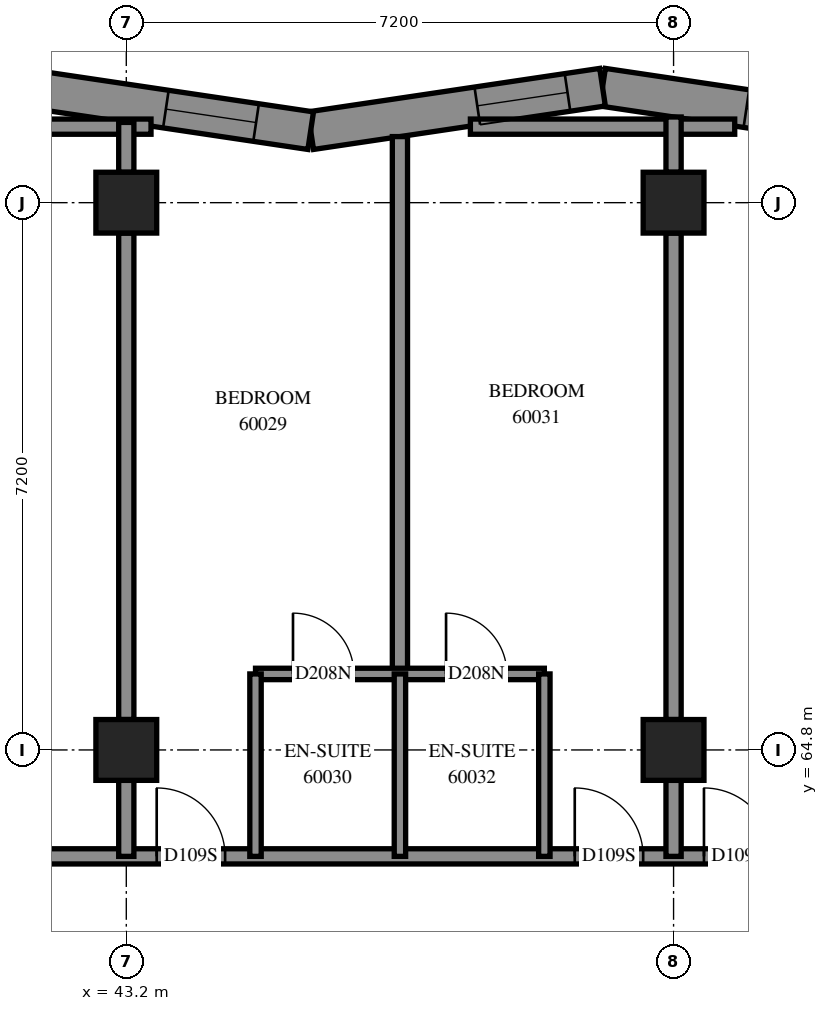
"""IFC4 building model, lengths in metres.
Left out: names, types, materials, properties, quantities, classifications, styles, units other than length and angle.
Written with IfcOpenShell. Run it as: python <this file> out.ifc"""

import sys

from ifc_helpers import new_model, si_unit, direction, frame, frame_2d, origin, origin_2d, place, context, subcontext, project, spatial, polyline, rectangle, outline, extrude, element, fill, save


model = new_model("IFC4")
c1 = context("Model", 3, precision=1e-05, world=origin(), true_north=direction((0.0, 1.0)))
c2 = subcontext(c1, "Body", "Model", "MODEL_VIEW")
j1 = project(units=[si_unit("LENGTHUNIT", "METRE"), si_unit("PLANEANGLEUNIT", "RADIAN")], contexts=[c1])
p1 = place(None, origin())
s1 = spatial("IfcSite", under=j1, at=p1, CompositionType="ELEMENT")
p2 = place(p1, origin())
s2 = spatial("IfcBuilding", under=s1, at=p2, CompositionType="ELEMENT")
p3 = place(p2, frame((0.0, 0.0, 220.2)))
s3 = spatial("IfcBuildingStorey", under=s2, at=p3, CompositionType="ELEMENT", Elevation=220.2)
for number, where, z_axis, x_axis in (
    (1, (43.2, 64.8, 0.0), (0.0, 0.0, 1.0), (1.0, 0.0, 0.0)),
    (2, (43.2, 72.0, 0.0), (0.0, 0.0, 1.0), (1.0, 0.0, 0.0)),
    (3, (50.4, 64.8, 0.0), (0.0, 0.0, 1.0), (1.0, 0.0, 0.0)),
    (4, (50.4, 72.0, 0.0), (0.0, 0.0, 1.0), (1.0, 0.0, 0.0)),
):
    element("IfcColumn", number, at=place(p3, frame(where, z_axis=z_axis, x_axis=x_axis)), inside=s3, PredefinedType="COLUMN", context=c2, shape_type="SweptSolid", body=[
        extrude(rectangle(XDim=0.8, YDim=0.8, at=origin_2d()), origin(), (0.0, 0.0, 1.0), 3.1),
    ])
p4 = place(p3, frame((53.305, 72.947, 0.0), z_axis=(0.0, 0.0, 1.0), x_axis=(-0.9890847468, 0.1473477641, 0.0)))
e5 = element("IfcWall", 5, at=p4, inside=s3, PredefinedType="SOLIDWALL", context=c2, shape_type="SweptSolid", body=[
    extrude(outline(polyline([(0.037, -0.25), (3.919, -0.25), (3.845, 0.25), (-0.037, 0.25), (0.037, -0.25)])), origin(), (0.0, 0.0, 1.0), 3.1),
])
p5 = place(p4, frame((0.769, 0.0, 0.45)))
e6 = element("IfcOpeningElement", 6, at=p5, cuts=e5, PredefinedType="OPENING", context=c2, shape_type="SweptSolid", body=[
    extrude(rectangle(XDim=1.2, YDim=2.5, at=frame_2d((0.6, 1.25))), frame((0.0, 0.26, 0.0), z_axis=(0.0, -1.0, 0.0), x_axis=(1.0, 0.0, 0.0)), (0.0, 0.0, 1.0), 0.52),
])
p6 = place(p3, frame((49.466, 73.519, 0.0), z_axis=(0.0, 0.0, 1.0), x_axis=(-0.9890847468, -0.1473477641, 0.0)))
e7 = element("IfcWall", 7, at=p6, inside=s3, PredefinedType="SOLIDWALL", context=c2, shape_type="SweptSolid", body=[
    extrude(outline(polyline([(-0.037, -0.25), (3.845, -0.25), (3.919, 0.25), (0.037, 0.25), (-0.037, -0.25)])), origin(), (0.0, 0.0, 1.0), 3.1),
])
p7 = place(p6, frame((0.466, 0.0, 0.45)))
e8 = element("IfcOpeningElement", 8, at=p7, cuts=e7, PredefinedType="OPENING", context=c2, shape_type="SweptSolid", body=[
    extrude(rectangle(XDim=1.2, YDim=2.5, at=frame_2d((0.6, 1.25))), frame((0.0, 0.26, 0.0), z_axis=(0.0, -1.0, 0.0), x_axis=(1.0, 0.0, 0.0)), (0.0, 0.0, 1.0), 0.52),
])
p8 = place(p3, frame((45.626, 72.947, 0.0), z_axis=(0.0, 0.0, 1.0), x_axis=(-0.9890853061, 0.14734401, 0.0)))
e9 = element("IfcWall", 9, at=p8, inside=s3, PredefinedType="SOLIDWALL", context=c2, shape_type="SweptSolid", body=[
    extrude(outline(polyline([(0.037, -0.25), (3.919, -0.25), (3.845, 0.25), (-0.037, 0.25), (0.037, -0.25)])), origin(), (0.0, 0.0, 1.0), 3.1),
])
p9 = place(p8, frame((0.726, 0.0, 0.45)))
e10 = element("IfcOpeningElement", 10, at=p9, cuts=e9, PredefinedType="OPENING", context=c2, shape_type="SweptSolid", body=[
    extrude(rectangle(XDim=1.2, YDim=2.5, at=frame_2d((0.6, 1.25))), frame((0.0, 0.26, 0.0), z_axis=(0.0, -1.0, 0.0), x_axis=(1.0, 0.0, 0.0)), (0.0, 0.0, 1.0), 0.52),
])
p10 = place(p3, frame((40.602, 63.4, 0.0), z_axis=(0.0, 0.0, 1.0), x_axis=(1.0, 0.0, 0.0)))
e11 = element("IfcWall", 11, at=p10, inside=s3, PredefinedType="PARTITIONING", context=c2, shape_type="SweptSolid", body=[
    extrude(rectangle(XDim=14.398, YDim=0.2, at=frame_2d((7.199, 0.0))), origin(), (0.0, 0.0, 1.0), 3.1),
])
p11 = place(p10, frame((2.998, 0.0, 0.0)))
e12 = element("IfcOpeningElement", 12, at=p11, cuts=e11, PredefinedType="OPENING", context=c2, shape_type="SweptSolid", body=[
    extrude(rectangle(XDim=0.9, YDim=2.1, at=frame_2d((0.45, 1.05))), frame((0.0, 0.11, 0.0), z_axis=(0.0, -1.0, 0.0), x_axis=(1.0, 0.0, 0.0)), (0.0, 0.0, 1.0), 0.22),
])
p12 = place(p10, frame((8.498, 0.0, 0.0)))
e13 = element("IfcOpeningElement", 13, at=p12, cuts=e11, PredefinedType="OPENING", context=c2, shape_type="SweptSolid", body=[
    extrude(rectangle(XDim=0.9, YDim=2.1, at=frame_2d((0.45, 1.05))), frame((0.0, 0.11, 0.0), z_axis=(0.0, -1.0, 0.0), x_axis=(1.0, 0.0, 0.0)), (0.0, 0.0, 1.0), 0.22),
])
p13 = place(p10, frame((10.198, 0.0, 0.0)))
e14 = element("IfcOpeningElement", 14, at=p13, cuts=e11, PredefinedType="OPENING", context=c2, shape_type="SweptSolid", body=[
    extrude(rectangle(XDim=0.9, YDim=2.1, at=frame_2d((0.45, 1.05))), frame((0.0, 0.11, 0.0), z_axis=(0.0, -1.0, 0.0), x_axis=(1.0, 0.0, 0.0)), (0.0, 0.0, 1.0), 0.22),
])
p14 = place(p3, frame((46.8, 65.8, 0.0), z_axis=(0.0, 0.0, 1.0), x_axis=(0.0, 1.0, 0.0)))
e15 = element("IfcWall", 15, at=p14, inside=s3, PredefinedType="PARTITIONING", context=c2, shape_type="SweptSolid", body=[
    extrude(rectangle(XDim=7.069, YDim=0.2, at=frame_2d((3.535, 0.0))), origin(), (0.0, 0.0, 1.0), 3.1),
])
for number, where, z_axis, x_axis in (
    (16, (43.2, 65.2, 0.0), (0.0, 0.0, 1.0), (0.0, 1.0, 0.0)),
    (17, (50.4, 65.2, 0.0), (0.0, 0.0, 1.0), (0.0, 1.0, 0.0)),
):
    element("IfcWall", number, at=place(p3, frame(where, z_axis=z_axis, x_axis=x_axis)), inside=s3, PredefinedType="PARTITIONING", context=c2, shape_type="SweptSolid", body=[
        extrude(rectangle(XDim=6.4, YDim=0.2, at=frame_2d((3.2, 0.0))), origin(), (0.0, 0.0, 1.0), 3.1),
    ])
p15 = place(p3, frame((44.9, 65.8, 0.0), z_axis=(0.0, 0.0, 1.0), x_axis=(1.0, 0.0, 0.0)))
e18 = element("IfcWall", 18, at=p15, inside=s3, PredefinedType="PARTITIONING", context=c2, shape_type="SweptSolid", body=[
    extrude(rectangle(XDim=3.8, YDim=0.15, at=frame_2d((1.9, 0.0))), origin(), (0.0, 0.0, 1.0), 3.1),
])
p16 = place(p15, frame((0.493, 0.0, 0.0)))
e19 = element("IfcOpeningElement", 19, at=p16, cuts=e18, PredefinedType="OPENING", context=c2, shape_type="SweptSolid", body=[
    extrude(rectangle(XDim=0.8, YDim=2.1, at=frame_2d((0.4, 1.05))), frame((0.0, 0.085, 0.0), z_axis=(0.0, -1.0, 0.0), x_axis=(1.0, 0.0, 0.0)), (0.0, 0.0, 1.0), 0.17),
])
p17 = place(p15, frame((2.507, 0.0, 0.0)))
e20 = element("IfcOpeningElement", 20, at=p17, cuts=e18, PredefinedType="OPENING", context=c2, shape_type="SweptSolid", body=[
    extrude(rectangle(XDim=0.8, YDim=2.1, at=frame_2d((0.4, 1.05))), frame((0.0, 0.085, 0.0), z_axis=(0.0, -1.0, 0.0), x_axis=(1.0, 0.0, 0.0)), (0.0, 0.0, 1.0), 0.17),
])
p18 = place(p3, frame((40.048, 73.0, 0.0), z_axis=(0.0, 0.0, 1.0), x_axis=(1.0, 0.0, 0.0)))
e21 = element("IfcWall", 21, at=p18, inside=s3, PredefinedType="PARTITIONING", context=c2, shape_type="SweptSolid", body=[
    extrude(rectangle(XDim=3.478, YDim=0.2, at=frame_2d((1.739, 0.0))), origin(), (0.0, 0.0, 1.0), 3.1),
])
p19 = place(p3, frame((47.727, 73.0, 0.0), z_axis=(0.0, 0.0, 1.0), x_axis=(1.0, 0.0, 0.0)))
e22 = element("IfcWall", 22, at=p19, inside=s3, PredefinedType="PARTITIONING", context=c2, shape_type="SweptSolid", body=[
    extrude(rectangle(XDim=3.478, YDim=0.2, at=frame_2d((1.739, 0.0))), origin(), (0.0, 0.0, 1.0), 3.1),
])
for number, where, z_axis, x_axis in (
    (23, (44.9, 63.4, 0.0), (0.0, 0.0, 1.0), (0.0, 1.0, 0.0)),
    (24, (46.8, 63.4, 0.0), (0.0, 0.0, 1.0), (0.0, 1.0, 0.0)),
    (25, (48.7, 63.4, 0.0), (0.0, 0.0, 1.0), (0.0, 1.0, 0.0)),
):
    element("IfcWall", number, at=place(p3, frame(where, z_axis=z_axis, x_axis=x_axis)), inside=s3, PredefinedType="PARTITIONING", context=c2, shape_type="SweptSolid", body=[
        extrude(rectangle(XDim=2.4, YDim=0.15, at=frame_2d((1.2, 0.0))), origin(), (0.0, 0.0, 1.0), 3.1),
    ])
for number, where, z_axis, x_axis in (
    (26, (43.2, 63.4, 0.0), (0.0, 0.0, 1.0), (0.0, 1.0, 0.0)),
    (27, (50.4, 63.4, 0.0), (0.0, 0.0, 1.0), (0.0, 1.0, 0.0)),
):
    element("IfcWall", number, at=place(p3, frame(where, z_axis=z_axis, x_axis=x_axis)), inside=s3, PredefinedType="PARTITIONING", context=c2, shape_type="SweptSolid", body=[
        extrude(rectangle(XDim=1.0, YDim=0.2, at=frame_2d((0.5, 0.0))), origin(), (0.0, 0.0, 1.0), 3.1),
    ])
p20 = place(p3, frame((50.4, 72.4, 0.0), z_axis=(0.0, 0.0, 1.0), x_axis=(0.0, 1.0, 0.0)))
e28 = element("IfcWall", 28, at=p20, inside=s3, PredefinedType="PARTITIONING", context=c2, shape_type="SweptSolid", body=[
    extrude(rectangle(XDim=0.727, YDim=0.2, at=frame_2d((0.364, 0.0))), origin(), (0.0, 0.0, 1.0), 3.1),
])
p21 = place(p3, frame((43.2, 72.4, 0.0), z_axis=(0.0, 0.0, 1.0), x_axis=(0.0, 1.0, 0.0)))
e29 = element("IfcWall", 29, at=p21, inside=s3, PredefinedType="PARTITIONING", context=c2, shape_type="SweptSolid", body=[
    extrude(rectangle(XDim=0.656, YDim=0.2, at=frame_2d((0.328, 0.0))), origin(), (0.0, 0.0, 1.0), 3.1),
])
p22 = place(p5, origin())
e30 = element("IfcWindow", 30, at=p22, inside=s3, PartitioningType="SINGLE_PANEL", PredefinedType="WINDOW", context=c2, shape_type="SweptSolid", body=[
    extrude(rectangle(XDim=1.2, YDim=2.5, at=frame_2d((0.6, 1.25))), frame((0.0, 0.18, 0.0), z_axis=(0.0, -1.0, 0.0), x_axis=(1.0, 0.0, 0.0)), (0.0, 0.0, 1.0), 0.06),
])
fill(e6, e30)
p23 = place(p7, origin())
e31 = element("IfcWindow", 31, at=p23, inside=s3, PartitioningType="SINGLE_PANEL", PredefinedType="WINDOW", context=c2, shape_type="SweptSolid", body=[
    extrude(rectangle(XDim=1.2, YDim=2.5, at=frame_2d((0.6, 1.25))), frame((0.0, 0.14, 0.0), z_axis=(0.0, -1.0, 0.0), x_axis=(1.0, 0.0, 0.0)), (0.0, 0.0, 1.0), 0.06),
])
fill(e8, e31)
p24 = place(p9, origin())
e32 = element("IfcWindow", 32, at=p24, inside=s3, PartitioningType="SINGLE_PANEL", PredefinedType="WINDOW", context=c2, shape_type="SweptSolid", body=[
    extrude(rectangle(XDim=1.2, YDim=2.5, at=frame_2d((0.6, 1.25))), frame((0.0, 0.18, 0.0), z_axis=(0.0, -1.0, 0.0), x_axis=(1.0, 0.0, 0.0)), (0.0, 0.0, 1.0), 0.06),
])
fill(e10, e32)
p25 = place(p11, origin())
e33 = element("IfcDoor", 33, at=p25, inside=s3, OperationType="SINGLE_SWING_RIGHT", PredefinedType="DOOR", context=c2, shape_type="SweptSolid", body=[
    extrude(rectangle(XDim=0.9, YDim=2.1, at=frame_2d((0.45, 1.05))), frame((0.0, 0.025, 0.0), z_axis=(0.0, -1.0, 0.0), x_axis=(1.0, 0.0, 0.0)), (0.0, 0.0, 1.0), 0.05),
])
fill(e12, e33)
p26 = place(p16, origin())
e34 = element("IfcDoor", 34, at=p26, inside=s3, OperationType="SINGLE_SWING_RIGHT", PredefinedType="DOOR", context=c2, shape_type="SweptSolid", body=[
    extrude(rectangle(XDim=0.8, YDim=2.1, at=frame_2d((0.4, 1.05))), frame((0.0, 0.025, 0.0), z_axis=(0.0, -1.0, 0.0), x_axis=(1.0, 0.0, 0.0)), (0.0, 0.0, 1.0), 0.05),
])
fill(e19, e34)
p27 = place(p12, origin())
e35 = element("IfcDoor", 35, at=p27, inside=s3, OperationType="SINGLE_SWING_LEFT", PredefinedType="DOOR", context=c2, shape_type="SweptSolid", body=[
    extrude(rectangle(XDim=0.9, YDim=2.1, at=frame_2d((0.45, 1.05))), frame((0.0, 0.025, 0.0), z_axis=(0.0, -1.0, 0.0), x_axis=(1.0, 0.0, 0.0)), (0.0, 0.0, 1.0), 0.05),
])
fill(e13, e35)
p28 = place(p17, origin())
e36 = element("IfcDoor", 36, at=p28, inside=s3, OperationType="SINGLE_SWING_RIGHT", PredefinedType="DOOR", context=c2, shape_type="SweptSolid", body=[
    extrude(rectangle(XDim=0.8, YDim=2.1, at=frame_2d((0.4, 1.05))), frame((0.0, 0.025, 0.0), z_axis=(0.0, -1.0, 0.0), x_axis=(1.0, 0.0, 0.0)), (0.0, 0.0, 1.0), 0.05),
])
fill(e20, e36)
p29 = place(p13, origin())
e37 = element("IfcDoor", 37, at=p29, inside=s3, OperationType="SINGLE_SWING_RIGHT", PredefinedType="DOOR", context=c2, shape_type="SweptSolid", body=[
    extrude(rectangle(XDim=0.9, YDim=2.1, at=frame_2d((0.45, 1.05))), frame((0.0, 0.025, 0.0), z_axis=(0.0, -1.0, 0.0), x_axis=(1.0, 0.0, 0.0)), (0.0, 0.0, 1.0), 0.05),
])
fill(e14, e37)
save(model, sys.argv[1])
